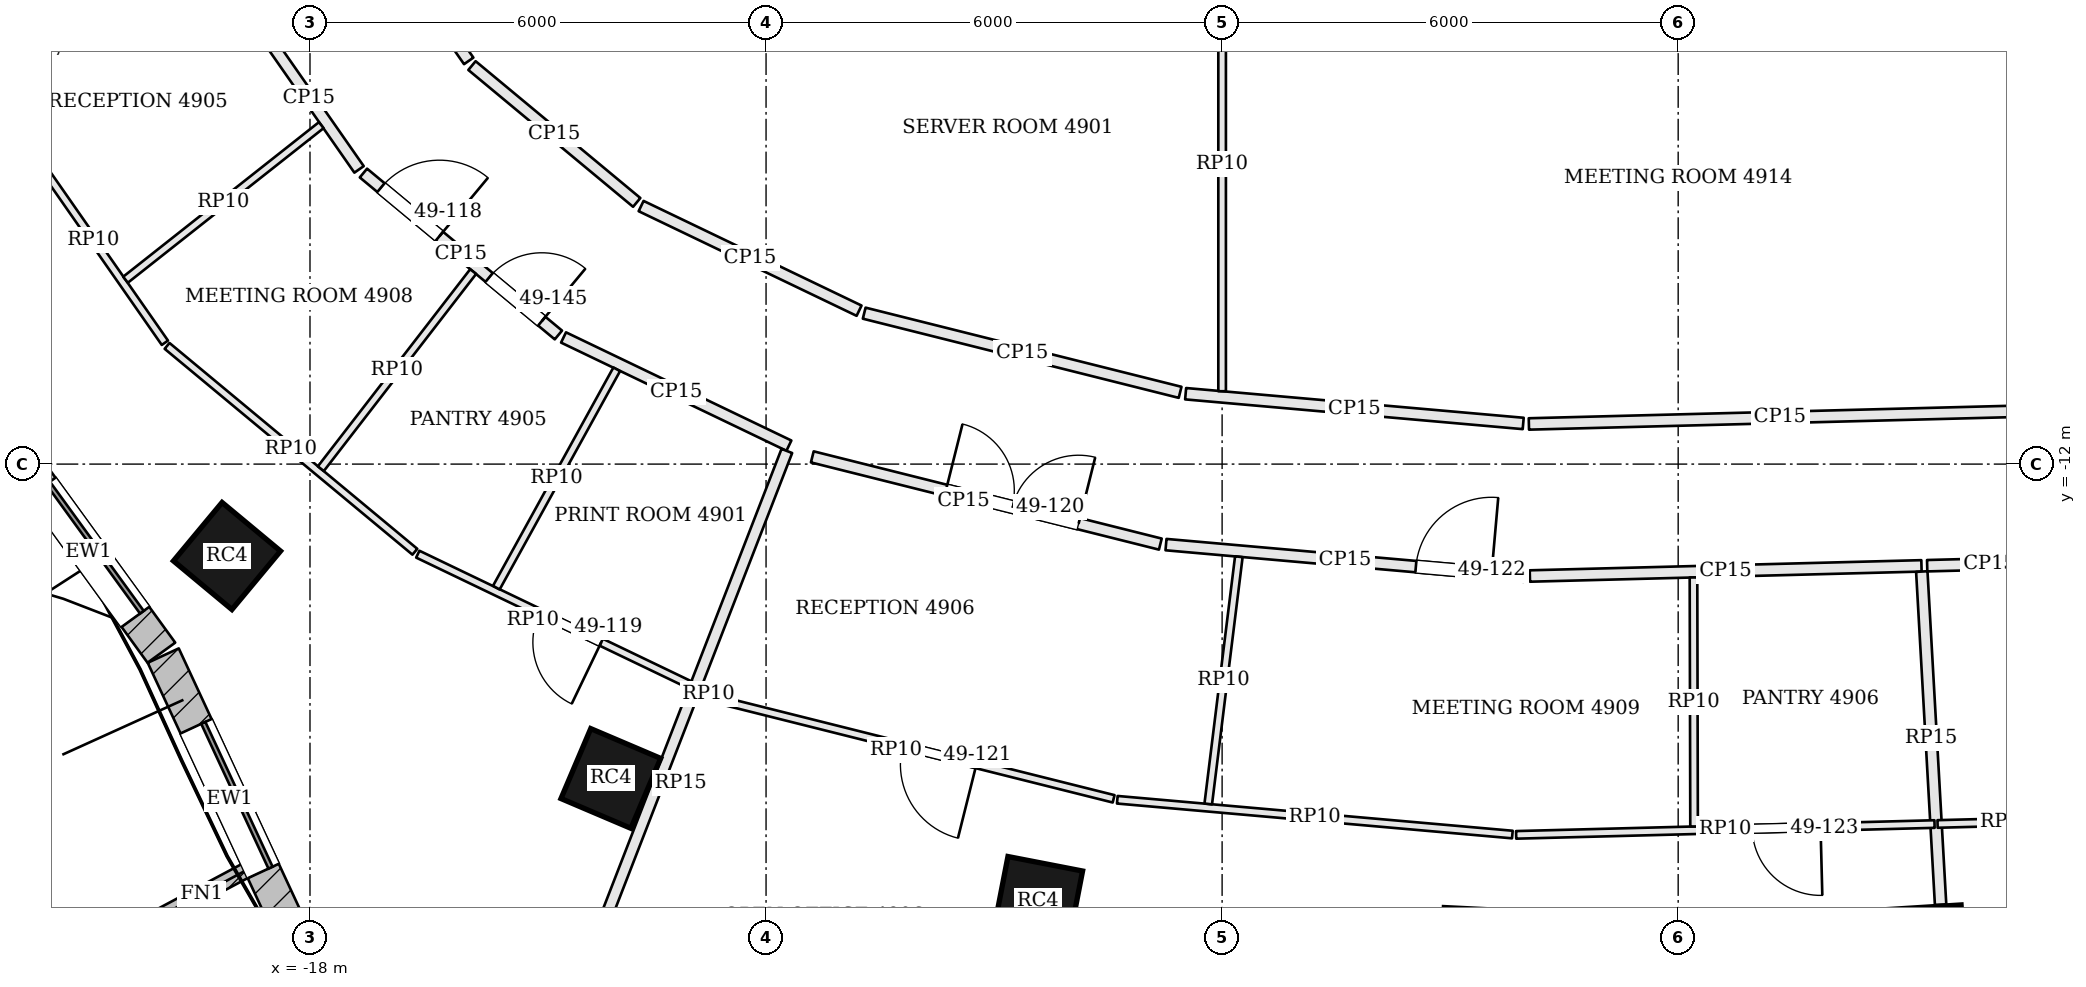
"""IFC4 building model, lengths in metres.
Left out: names, types, materials, properties, quantities, classifications, styles, units other than length and angle.
Written with IfcOpenShell. Run it as: python <this file> out.ifc"""

import sys

from ifc_helpers import new_model, si_unit, direction, frame, frame_2d, origin, origin_2d, place, context, subcontext, project, spatial, rectangle, extrude, element, fill, save


model = new_model("IFC4")
c1 = context("Model", 3, precision=1e-05, world=origin(), true_north=direction((0.0, 1.0)))
c2 = subcontext(c1, "Body", "Model", "MODEL_VIEW")
j1 = project(units=[si_unit("LENGTHUNIT", "METRE"), si_unit("PLANEANGLEUNIT", "RADIAN")], contexts=[c1])
p1 = place(None, origin())
s1 = spatial("IfcSite", under=j1, at=p1, CompositionType="ELEMENT")
p2 = place(p1, origin())
s2 = spatial("IfcBuilding", under=s1, at=p2, CompositionType="ELEMENT")
p3 = place(p2, frame((0.0, 0.0, 201.3)))
s3 = spatial("IfcBuildingStorey", under=s2, at=p3, CompositionType="ELEMENT", Elevation=201.3)
for number, where, z_axis, x_axis in (
    (1, (-19.092, -13.209, 0.0), (0.0, 0.0, 1.0), (0.769, -0.639, 0.0)),
    (2, (-14.042, -16.136, 0.0), (0.0, 0.0, 1.0), (0.92, -0.392, 0.0)),
    (3, (-8.422, -17.749, 0.0), (0.0, 0.0, 1.0), (0.982, -0.191, 0.0)),
    (4, (3.254, -18.33, 0.0), (0.0, 0.0, 1.0), (0.998, 0.063, 0.0)),
):
    element("IfcColumn", number, at=place(p3, frame(where, z_axis=z_axis, x_axis=x_axis)), inside=s3, PredefinedType="COLUMN", context=c2, shape_type="SweptSolid", body=[
        extrude(rectangle(XDim=1.0, YDim=1.0, at=origin_2d()), origin(), (0.0, 0.0, 1.0), 3.9),
    ])
p4 = place(p3, frame((-21.872, -11.841, 0.0), z_axis=(0.0, 0.0, 1.0), x_axis=(0.587562050363, -0.809179113036, 0.0)))
e5 = element("IfcWall", 5, at=p4, inside=s3, PredefinedType="SOLIDWALL", context=c2, shape_type="SweptSolid", body=[
    extrude(rectangle(XDim=3.263, YDim=0.45, at=frame_2d((1.631, 0.0))), origin(), (0.0, 0.0, 1.0), 3.7),
])
p5 = place(p4, frame((0.582, 0.0, 0.9)))
e6 = element("IfcOpeningElement", 6, at=p5, cuts=e5, PredefinedType="OPENING", context=c2, shape_type="SweptSolid", body=[
    extrude(rectangle(XDim=2.1, YDim=2.3, at=frame_2d((1.05, 1.15))), frame((0.0, 0.235, 0.0), z_axis=(0.0, -1.0, 0.0), x_axis=(1.0, 0.0, 0.0)), (0.0, 0.0, 1.0), 0.47),
])
p6 = place(p3, frame((-19.931, -14.519, 0.0), z_axis=(0.0, 0.0, 1.0), x_axis=(0.421138964136, -0.906996126169, 0.0)))
e7 = element("IfcWall", 7, at=p6, inside=s3, PredefinedType="SOLIDWALL", context=c2, shape_type="SweptSolid", body=[
    extrude(rectangle(XDim=4.15, YDim=0.45, at=frame_2d((2.075, 0.0))), origin(), (0.0, 0.0, 1.0), 3.7),
])
p7 = place(p6, frame((1.025, 0.0, 0.9)))
e8 = element("IfcOpeningElement", 8, at=p7, cuts=e7, PredefinedType="OPENING", context=c2, shape_type="SweptSolid", body=[
    extrude(rectangle(XDim=2.1, YDim=2.3, at=frame_2d((1.05, 1.15))), frame((0.0, 0.235, 0.0), z_axis=(0.0, -1.0, 0.0), x_axis=(1.0, 0.0, 0.0)), (0.0, 0.0, 1.0), 0.47),
])
p8 = place(p3, frame((-18.651, -17.243, 0.0), z_axis=(0.0, 0.0, 1.0), x_axis=(-0.882225472329, -0.470827161466, 0.0)))
e9 = element("IfcWall", 9, at=p8, inside=s3, PredefinedType="SOLIDWALL", context=c2, shape_type="SweptSolid", body=[
    extrude(rectangle(XDim=1.75, YDim=0.2, at=frame_2d((0.875, 0.0))), origin(), (0.0, 0.0, 1.0), 3.7),
])
p9 = place(p3, frame((-18.674, -6.232, 0.0), z_axis=(0.0, 0.0, 1.0), x_axis=(0.572118665737, -0.820170855563, 0.0)))
e10 = element("IfcWall", 10, at=p9, inside=s3, PredefinedType="PARTITIONING", context=c2, shape_type="SweptSolid", body=[
    extrude(rectangle(XDim=2.306, YDim=0.15, at=frame_2d((1.153, 0.0))), origin(), (0.0, 0.0, 1.0), 3.084),
])
p10 = place(p3, frame((-17.297, -8.171, 0.0), z_axis=(0.0, 0.0, 1.0), x_axis=(0.769228575061, -0.638973707839, 0.0)))
e11 = element("IfcWall", 11, at=p10, inside=s3, PredefinedType="PARTITIONING", context=c2, shape_type="SweptSolid", body=[
    extrude(rectangle(XDim=3.334, YDim=0.15, at=frame_2d((1.667, 0.0))), origin(), (0.0, 0.0, 1.0), 3.084),
])
p11 = place(p10, frame((0.3, 0.0, 0.0)))
e12 = element("IfcOpeningElement", 12, at=p11, cuts=e11, PredefinedType="OPENING", context=c2, shape_type="SweptSolid", body=[
    extrude(rectangle(XDim=1.0, YDim=2.4, at=frame_2d((0.5, 1.2))), frame((0.0, 0.085, 0.0), z_axis=(0.0, -1.0, 0.0), x_axis=(1.0, 0.0, 0.0)), (0.0, 0.0, 1.0), 0.17),
])
p12 = place(p10, frame((2.15, 0.0, 0.0)))
e13 = element("IfcOpeningElement", 13, at=p12, cuts=e11, PredefinedType="OPENING", context=c2, shape_type="SweptSolid", body=[
    extrude(rectangle(XDim=0.9, YDim=2.1, at=frame_2d((0.45, 1.05))), frame((0.0, 0.085, 0.0), z_axis=(0.0, -1.0, 0.0), x_axis=(1.0, 0.0, 0.0)), (0.0, 0.0, 1.0), 0.17),
])
p13 = place(p3, frame((-14.664, -10.334, 0.0), z_axis=(0.0, 0.0, 1.0), x_axis=(0.901511473943, -0.432755199101, 0.0)))
e14 = element("IfcWall", 14, at=p13, inside=s3, PredefinedType="PARTITIONING", context=c2, shape_type="SweptSolid", body=[
    extrude(rectangle(XDim=3.289, YDim=0.15, at=frame_2d((1.645, 0.0))), origin(), (0.0, 0.0, 1.0), 3.084),
])
p14 = place(p3, frame((-15.115, -20.562, 0.0), z_axis=(0.0, 0.0, 1.0), x_axis=(0.361729399691, 0.932283133709, 0.0)))
e15 = element("IfcWall", 15, at=p14, inside=s3, PredefinedType="PARTITIONING", context=c2, shape_type="SweptSolid", body=[
    extrude(rectangle(XDim=9.369, YDim=0.15, at=frame_2d((4.685, 0.0))), origin(), (0.0, 0.0, 1.0), 3.084),
])
p15 = place(p3, frame((-11.392, -11.905, 0.0), z_axis=(0.0, 0.0, 1.0), x_axis=(0.970002383823, -0.243095403859, 0.0)))
e16 = element("IfcWall", 16, at=p15, inside=s3, PredefinedType="PARTITIONING", context=c2, shape_type="SweptSolid", body=[
    extrude(rectangle(XDim=4.72, YDim=0.15, at=frame_2d((2.36, 0.0))), origin(), (0.0, 0.0, 1.0), 3.084),
])
p16 = place(p15, frame((1.812, 0.0, 0.0)))
e17 = element("IfcOpeningElement", 17, at=p16, cuts=e16, PredefinedType="OPENING", context=c2, shape_type="SweptSolid", body=[
    extrude(rectangle(XDim=1.8, YDim=2.1, at=frame_2d((0.9, 1.05))), frame((0.0, 0.085, 0.0), z_axis=(0.0, -1.0, 0.0), x_axis=(1.0, 0.0, 0.0)), (0.0, 0.0, 1.0), 0.17),
])
p17 = place(p3, frame((-6.738, -13.059, 0.0), z_axis=(0.0, 0.0, 1.0), x_axis=(0.996143527037, -0.087738666181, 0.0)))
e18 = element("IfcWall", 18, at=p17, inside=s3, PredefinedType="PARTITIONING", context=c2, shape_type="SweptSolid", body=[
    extrude(rectangle(XDim=4.73, YDim=0.15, at=frame_2d((2.365, 0.0))), origin(), (0.0, 0.0, 1.0), 3.084),
])
p18 = place(p17, frame((3.3, 0.0, 0.0)))
e19 = element("IfcOpeningElement", 19, at=p18, cuts=e18, PredefinedType="OPENING", context=c2, shape_type="SweptSolid", body=[
    extrude(rectangle(XDim=1.0, YDim=2.4, at=frame_2d((0.5, 1.2))), frame((0.0, 0.085, 0.0), z_axis=(0.0, -1.0, 0.0), x_axis=(1.0, 0.0, 0.0)), (0.0, 0.0, 1.0), 0.17),
])
p19 = place(p3, frame((-1.951, -13.472, 0.0), z_axis=(0.0, 0.0, 1.0), x_axis=(0.999664233407, 0.025911782006, 0.0)))
e20 = element("IfcWall", 20, at=p19, inside=s3, PredefinedType="PARTITIONING", context=c2, shape_type="SweptSolid", body=[
    extrude(rectangle(XDim=5.154, YDim=0.15, at=frame_2d((2.577, 0.0))), origin(), (0.0, 0.0, 1.0), 3.084),
])
p20 = place(p3, frame((3.452, -17.796, 0.0), z_axis=(0.0, 0.0, 1.0), x_axis=(-0.056341757652, 0.998411541572, 0.0)))
e21 = element("IfcWall", 21, at=p20, inside=s3, PredefinedType="PARTITIONING", context=c2, shape_type="SweptSolid", body=[
    extrude(rectangle(XDim=4.39, YDim=0.15, at=frame_2d((2.195, 0.0))), origin(), (0.0, 0.0, 1.0), 3.084),
])
p21 = place(p3, frame((3.276, -13.337, 0.0), z_axis=(0.0, 0.0, 1.0), x_axis=(0.999662995572, 0.025959493133, 0.0)))
e22 = element("IfcWall", 22, at=p21, inside=s3, PredefinedType="PARTITIONING", context=c2, shape_type="SweptSolid", body=[
    extrude(rectangle(XDim=1.646, YDim=0.15, at=frame_2d((0.823, 0.0))), origin(), (0.0, 0.0, 1.0), 3.084),
])
p22 = place(p3, frame((4.645, -11.301, 0.0), z_axis=(0.0, 0.0, 1.0), x_axis=(-0.9996648469, -0.02588810291, 0.0)))
e23 = element("IfcWall", 23, at=p22, inside=s3, PredefinedType="PARTITIONING", context=c2, shape_type="SweptSolid", body=[
    extrude(rectangle(XDim=6.611, YDim=0.15, at=frame_2d((3.305, 0.0))), origin(), (0.0, 0.0, 1.0), 3.084),
])
p23 = place(p3, frame((-2.039, -11.465, 0.0), z_axis=(0.0, 0.0, 1.0), x_axis=(-0.996139855484, 0.087780341286, 0.0)))
e24 = element("IfcWall", 24, at=p23, inside=s3, PredefinedType="PARTITIONING", context=c2, shape_type="SweptSolid", body=[
    extrude(rectangle(XDim=4.458, YDim=0.15, at=frame_2d((2.229, 0.0))), origin(), (0.0, 0.0, 1.0), 3.084),
])
p24 = place(p3, frame((-6.553, -11.056, 0.0), z_axis=(0.0, 0.0, 1.0), x_axis=(-0.970004917182, 0.243085294995, 0.0)))
e25 = element("IfcWall", 25, at=p24, inside=s3, PredefinedType="PARTITIONING", context=c2, shape_type="SweptSolid", body=[
    extrude(rectangle(XDim=4.284, YDim=0.15, at=frame_2d((2.142, 0.0))), origin(), (0.0, 0.0, 1.0), 3.084),
])
p25 = place(p3, frame((-10.776, -9.982, 0.0), z_axis=(0.0, 0.0, 1.0), x_axis=(-0.901511079436, 0.432756020933, 0.0)))
e26 = element("IfcWall", 26, at=p25, inside=s3, PredefinedType="PARTITIONING", context=c2, shape_type="SweptSolid", body=[
    extrude(rectangle(XDim=3.181, YDim=0.15, at=frame_2d((1.59, 0.0))), origin(), (0.0, 0.0, 1.0), 3.084),
])
p26 = place(p3, frame((-13.702, -8.557, 0.0), z_axis=(0.0, 0.0, 1.0), x_axis=(-0.769221825067, 0.638981833733, 0.0)))
e27 = element("IfcWall", 27, at=p26, inside=s3, PredefinedType="PARTITIONING", context=c2, shape_type="SweptSolid", body=[
    extrude(rectangle(XDim=2.817, YDim=0.15, at=frame_2d((1.409, 0.0))), origin(), (0.0, 0.0, 1.0), 3.084),
])
p27 = place(p3, frame((-15.912, -6.696, 0.0), z_axis=(0.0, 0.0, 1.0), x_axis=(-0.572078533763, 0.820198848578, 0.0)))
e28 = element("IfcWall", 28, at=p27, inside=s3, PredefinedType="PARTITIONING", context=c2, shape_type="SweptSolid", body=[
    extrude(rectangle(XDim=1.742, YDim=0.15, at=frame_2d((0.871, 0.0))), origin(), (0.0, 0.0, 1.0), 3.084),
])
p28 = place(p3, frame((-12.951, -14.928, 0.0), z_axis=(0.0, 0.0, 1.0), x_axis=(-0.901512652017, 0.43275274494, 0.0)))
e29 = element("IfcWall", 29, at=p28, inside=s3, PredefinedType="PARTITIONING", context=c2, shape_type="SweptSolid", body=[
    extrude(rectangle(XDim=4.028, YDim=0.1, at=frame_2d((2.014, 0.0))), origin(), (0.0, 0.0, 1.0), 3.084),
])
p29 = place(p28, frame((1.35, 0.0, 0.0)))
e30 = element("IfcOpeningElement", 30, at=p29, cuts=e29, PredefinedType="OPENING", context=c2, shape_type="SweptSolid", body=[
    extrude(rectangle(XDim=0.9, YDim=2.1, at=frame_2d((0.45, 1.05))), frame((0.0, 0.06, 0.0), z_axis=(0.0, -1.0, 0.0), x_axis=(1.0, 0.0, 0.0)), (0.0, 0.0, 1.0), 0.12),
])
p30 = place(p3, frame((-16.62, -13.153, 0.0), z_axis=(0.0, 0.0, 1.0), x_axis=(-0.76922129881, 0.638982467253, 0.0)))
e31 = element("IfcWall", 31, at=p30, inside=s3, PredefinedType="PARTITIONING", context=c2, shape_type="SweptSolid", body=[
    extrude(rectangle(XDim=4.238, YDim=0.1, at=frame_2d((2.119, 0.0))), origin(), (0.0, 0.0, 1.0), 3.084),
])
p31 = place(p3, frame((-19.909, -10.404, 0.0), z_axis=(0.0, 0.0, 1.0), x_axis=(-0.572111951901, 0.820175538828, 0.0)))
e32 = element("IfcWall", 32, at=p31, inside=s3, PredefinedType="PARTITIONING", context=c2, shape_type="SweptSolid", body=[
    extrude(rectangle(XDim=3.29, YDim=0.1, at=frame_2d((1.645, 0.0))), origin(), (0.0, 0.0, 1.0), 3.084),
])
p32 = place(p3, frame((-17.852, -7.541, 0.0), z_axis=(0.0, 0.0, 1.0), x_axis=(-0.784859909174, -0.61967323887, 0.0)))
e33 = element("IfcWall", 33, at=p32, inside=s3, PredefinedType="PARTITIONING", context=c2, shape_type="SweptSolid", body=[
    extrude(rectangle(XDim=3.281, YDim=0.1, at=frame_2d((1.641, 0.0))), origin(), (0.0, 0.0, 1.0), 3.084),
])
p33 = place(p3, frame((-15.854, -9.467, 0.0), z_axis=(0.0, 0.0, 1.0), x_axis=(-0.611487785641, -0.791253870772, 0.0)))
e34 = element("IfcWall", 34, at=p33, inside=s3, PredefinedType="PARTITIONING", context=c2, shape_type="SweptSolid", body=[
    extrude(rectangle(XDim=3.277, YDim=0.1, at=frame_2d((1.639, 0.0))), origin(), (0.0, 0.0, 1.0), 3.084),
])
p34 = place(p3, frame((-13.965, -10.753, 0.0), z_axis=(0.0, 0.0, 1.0), x_axis=(-0.48287271045, -0.875690553508, 0.0)))
e35 = element("IfcWall", 35, at=p34, inside=s3, PredefinedType="PARTITIONING", context=c2, shape_type="SweptSolid", body=[
    extrude(rectangle(XDim=3.28, YDim=0.1, at=frame_2d((1.64, 0.0))), origin(), (0.0, 0.0, 1.0), 3.084),
])
p35 = place(p3, frame((3.373, -16.736, 0.0), z_axis=(0.0, 0.0, 1.0), x_axis=(-0.99966581351, -0.025850750467, 0.0)))
e36 = element("IfcWall", 36, at=p35, inside=s3, PredefinedType="PARTITIONING", context=c2, shape_type="SweptSolid", body=[
    extrude(rectangle(XDim=5.506, YDim=0.1, at=frame_2d((2.753, 0.0))), origin(), (0.0, 0.0, 1.0), 3.084),
])
p36 = place(p35, frame((1.5, 0.0, 0.0)))
e37 = element("IfcOpeningElement", 37, at=p36, cuts=e36, PredefinedType="OPENING", context=c2, shape_type="SweptSolid", body=[
    extrude(rectangle(XDim=0.9, YDim=2.1, at=frame_2d((0.45, 1.05))), frame((0.0, 0.06, 0.0), z_axis=(0.0, -1.0, 0.0), x_axis=(1.0, 0.0, 0.0)), (0.0, 0.0, 1.0), 0.12),
])
p37 = place(p3, frame((-2.181, -16.874, 0.0), z_axis=(0.0, 0.0, 1.0), x_axis=(-0.996143934904, 0.087734035321, 0.0)))
e38 = element("IfcWall", 38, at=p37, inside=s3, PredefinedType="PARTITIONING", context=c2, shape_type="SweptSolid", body=[
    extrude(rectangle(XDim=5.218, YDim=0.1, at=frame_2d((2.609, 0.0))), origin(), (0.0, 0.0, 1.0), 3.084),
])
p38 = place(p3, frame((-7.427, -16.404, 0.0), z_axis=(0.0, 0.0, 1.0), x_axis=(-0.970009158253, 0.243068370845, 0.0)))
e39 = element("IfcWall", 39, at=p38, inside=s3, PredefinedType="PARTITIONING", context=c2, shape_type="SweptSolid", body=[
    extrude(rectangle(XDim=5.283, YDim=0.1, at=frame_2d((2.642, 0.0))), origin(), (0.0, 0.0, 1.0), 3.084),
])
p39 = place(p38, frame((1.861, 0.0, 0.0)))
e40 = element("IfcOpeningElement", 40, at=p39, cuts=e39, PredefinedType="OPENING", context=c2, shape_type="SweptSolid", body=[
    extrude(rectangle(XDim=1.0, YDim=2.1, at=frame_2d((0.5, 1.05))), frame((0.0, 0.06, 0.0), z_axis=(0.0, -1.0, 0.0), x_axis=(1.0, 0.0, 0.0)), (0.0, 0.0, 1.0), 0.12),
])
p40 = place(p3, frame((-12.597, -15.098, 0.0), z_axis=(0.0, 0.0, 1.0), x_axis=(-0.901523057468, 0.432731067585, 0.0)))
e41 = element("IfcWall", 41, at=p40, inside=s3, PredefinedType="PARTITIONING", context=c2, shape_type="SweptSolid", body=[
    extrude(rectangle(XDim=0.352, YDim=0.1, at=frame_2d((0.176, 0.0))), origin(), (0.0, 0.0, 1.0), 3.084),
])
p41 = place(p3, frame((-5.78, -13.219, 0.0), z_axis=(0.0, 0.0, 1.0), x_axis=(-0.122778425758, -0.992434107721, 0.0)))
e42 = element("IfcWall", 42, at=p41, inside=s3, PredefinedType="PARTITIONING", context=c2, shape_type="SweptSolid", body=[
    extrude(rectangle(XDim=3.277, YDim=0.1, at=frame_2d((1.639, 0.0))), origin(), (0.0, 0.0, 1.0), 3.084),
])
p42 = place(p3, frame((0.201, -13.491, 0.0), z_axis=(0.0, 0.0, 1.0), x_axis=(0.002384849381, -0.999997156243, 0.0)))
e43 = element("IfcWall", 43, at=p42, inside=s3, PredefinedType="PARTITIONING", context=c2, shape_type="SweptSolid", body=[
    extrude(rectangle(XDim=3.276, YDim=0.1, at=frame_2d((1.638, 0.0))), origin(), (0.0, 0.0, 1.0), 3.084),
])
p43 = place(p3, frame((5.214, -16.688, 0.0), z_axis=(0.0, 0.0, 1.0), x_axis=(-0.999661565486, -0.026014505364, 0.0)))
e44 = element("IfcWall", 44, at=p43, inside=s3, PredefinedType="PARTITIONING", context=c2, shape_type="SweptSolid", body=[
    extrude(rectangle(XDim=1.802, YDim=0.1, at=frame_2d((0.901, 0.0))), origin(), (0.0, 0.0, 1.0), 3.084),
])
p44 = place(p3, frame((-6.0, -11.041, 0.0), z_axis=(0.0, 0.0, 1.0), x_axis=(0.0, 1.0, 0.0)))
e45 = element("IfcWall", 45, at=p44, inside=s3, PredefinedType="PARTITIONING", context=c2, shape_type="SweptSolid", body=[
    extrude(rectangle(XDim=5.966, YDim=0.1, at=frame_2d((2.983, 0.0))), origin(), (0.0, 0.0, 1.0), 3.084),
])
p45 = place(p5, origin())
e46 = element("IfcWindow", 46, at=p45, inside=s3, PartitioningType="SINGLE_PANEL", PredefinedType="WINDOW", context=c2, shape_type="SweptSolid", body=[
    extrude(rectangle(XDim=2.1, YDim=2.3, at=frame_2d((1.05, 1.15))), frame((0.0, 0.135, 0.0), z_axis=(0.0, -1.0, 0.0), x_axis=(1.0, 0.0, 0.0)), (0.0, 0.0, 1.0), 0.06),
])
fill(e6, e46)
p46 = place(p7, origin())
e47 = element("IfcWindow", 47, at=p46, inside=s3, PartitioningType="SINGLE_PANEL", PredefinedType="WINDOW", context=c2, shape_type="SweptSolid", body=[
    extrude(rectangle(XDim=2.1, YDim=2.3, at=frame_2d((1.05, 1.15))), frame((0.0, 0.135, 0.0), z_axis=(0.0, -1.0, 0.0), x_axis=(1.0, 0.0, 0.0)), (0.0, 0.0, 1.0), 0.06),
])
fill(e8, e47)
p47 = place(p11, origin())
e48 = element("IfcDoor", 48, at=p47, inside=s3, OperationType="SINGLE_SWING_RIGHT", PredefinedType="DOOR", context=c2, shape_type="SweptSolid", body=[
    extrude(rectangle(XDim=1.0, YDim=2.4, at=frame_2d((0.5, 1.2))), frame((0.0, 0.025, 0.0), z_axis=(0.0, -1.0, 0.0), x_axis=(1.0, 0.0, 0.0)), (0.0, 0.0, 1.0), 0.05),
])
fill(e12, e48)
p48 = place(p29, origin())
e49 = element("IfcDoor", 49, at=p48, inside=s3, OperationType="SINGLE_SWING_LEFT", PredefinedType="DOOR", context=c2, shape_type="SweptSolid", body=[
    extrude(rectangle(XDim=0.9, YDim=2.1, at=frame_2d((0.45, 1.05))), frame((0.0, 0.025, 0.0), z_axis=(0.0, -1.0, 0.0), x_axis=(1.0, 0.0, 0.0)), (0.0, 0.0, 1.0), 0.05),
])
fill(e30, e49)
p49 = place(p16, origin())
e50 = element("IfcDoor", 50, at=p49, inside=s3, OperationType="DOUBLE_DOOR_SINGLE_SWING", PredefinedType="DOOR", context=c2, shape_type="SweptSolid", body=[
    extrude(rectangle(XDim=1.8, YDim=2.1, at=frame_2d((0.9, 1.05))), frame((0.0, 0.025, 0.0), z_axis=(0.0, -1.0, 0.0), x_axis=(1.0, 0.0, 0.0)), (0.0, 0.0, 1.0), 0.05),
])
fill(e17, e50)
p50 = place(p39, origin())
e51 = element("IfcDoor", 51, at=p50, inside=s3, OperationType="SINGLE_SWING_LEFT", PredefinedType="DOOR", context=c2, shape_type="SweptSolid", body=[
    extrude(rectangle(XDim=1.0, YDim=2.1, at=frame_2d((0.5, 1.05))), frame((0.0, 0.025, 0.0), z_axis=(0.0, -1.0, 0.0), x_axis=(1.0, 0.0, 0.0)), (0.0, 0.0, 1.0), 0.05),
])
fill(e40, e51)
p51 = place(p18, origin())
e52 = element("IfcDoor", 52, at=p51, inside=s3, OperationType="SINGLE_SWING_RIGHT", PredefinedType="DOOR", context=c2, shape_type="SweptSolid", body=[
    extrude(rectangle(XDim=1.0, YDim=2.4, at=frame_2d((0.5, 1.2))), frame((0.0, 0.025, 0.0), z_axis=(0.0, -1.0, 0.0), x_axis=(1.0, 0.0, 0.0)), (0.0, 0.0, 1.0), 0.05),
])
fill(e19, e52)
p52 = place(p36, origin())
e53 = element("IfcDoor", 53, at=p52, inside=s3, OperationType="SINGLE_SWING_LEFT", PredefinedType="DOOR", context=c2, shape_type="SweptSolid", body=[
    extrude(rectangle(XDim=0.9, YDim=2.1, at=frame_2d((0.45, 1.05))), frame((0.0, 0.025, 0.0), z_axis=(0.0, -1.0, 0.0), x_axis=(1.0, 0.0, 0.0)), (0.0, 0.0, 1.0), 0.05),
])
fill(e37, e53)
p53 = place(p12, origin())
e54 = element("IfcDoor", 54, at=p53, inside=s3, OperationType="SINGLE_SWING_RIGHT", PredefinedType="DOOR", context=c2, shape_type="SweptSolid", body=[
    extrude(rectangle(XDim=0.9, YDim=2.1, at=frame_2d((0.45, 1.05))), frame((0.0, 0.025, 0.0), z_axis=(0.0, -1.0, 0.0), x_axis=(1.0, 0.0, 0.0)), (0.0, 0.0, 1.0), 0.05),
])
fill(e13, e54)
save(model, sys.argv[1])
